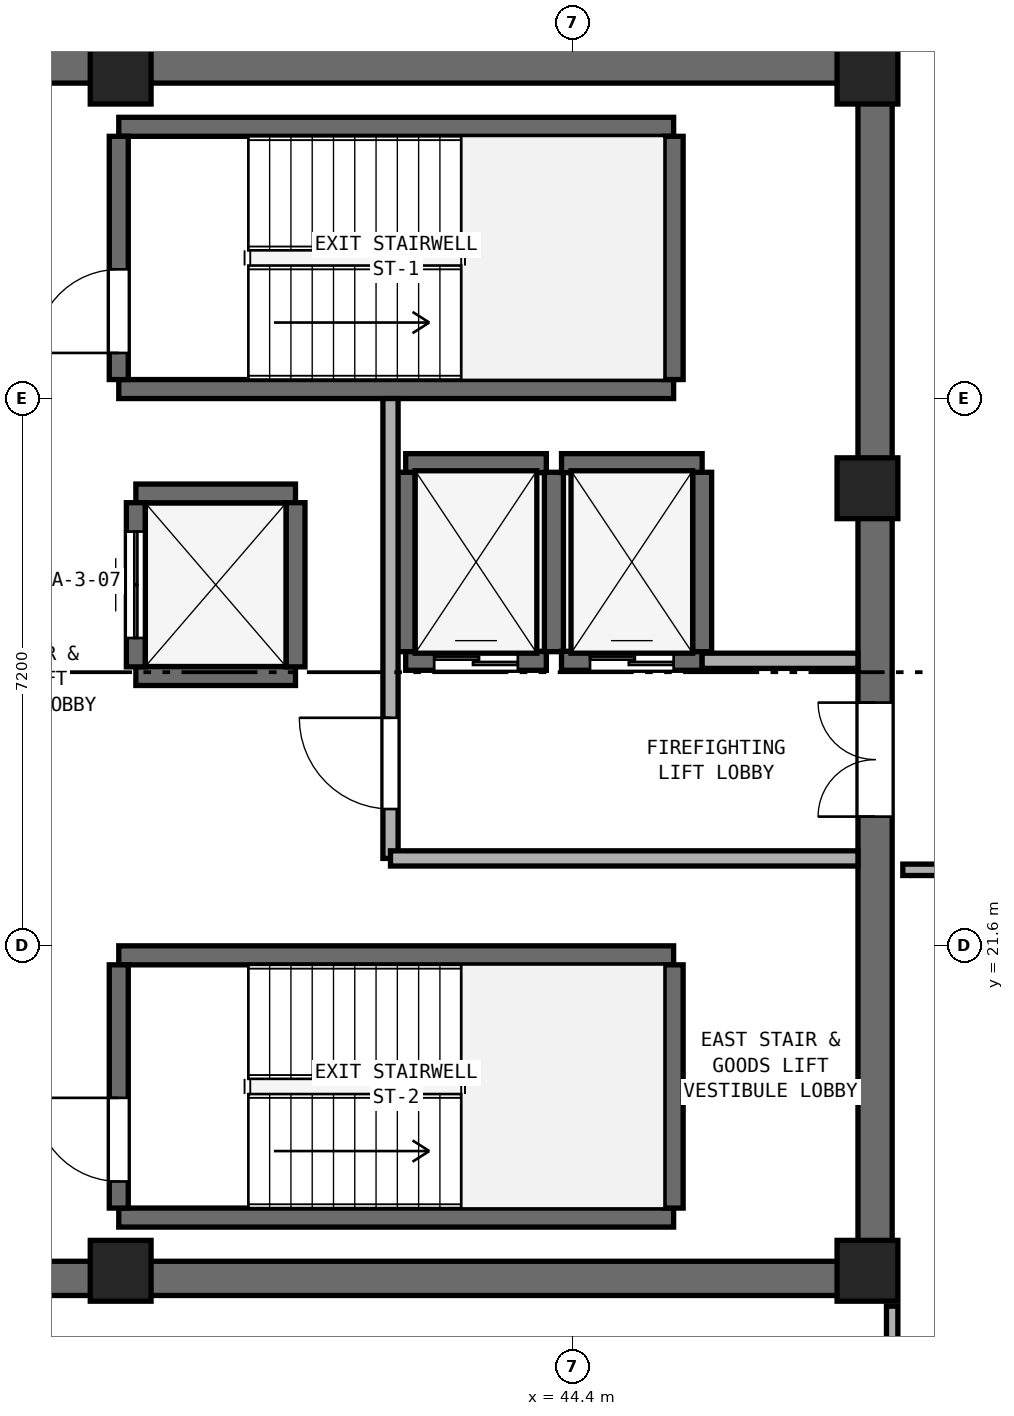
"""IFC4 building model, lengths in metres.
Left out: names, types, materials, properties, quantities, classifications, styles, units other than length and angle.
Written with IfcOpenShell. Run it as: python <this file> out.ifc"""

import sys

from ifc_helpers import new_model, si_unit, direction, frame, frame_2d, origin, origin_2d, place, context, subcontext, project, spatial, rectangle, extrude, element, fill, save


model = new_model("IFC4")
c1 = context("Model", 3, precision=1e-05, world=origin(), true_north=direction((0.0, 1.0)))
c2 = subcontext(c1, "Body", "Model", "MODEL_VIEW")
j1 = project(units=[si_unit("LENGTHUNIT", "METRE"), si_unit("PLANEANGLEUNIT", "RADIAN")], contexts=[c1])
p1 = place(None, origin())
s1 = spatial("IfcSite", under=j1, at=p1, CompositionType="ELEMENT")
p2 = place(p1, origin())
s2 = spatial("IfcBuilding", under=s1, at=p2, CompositionType="ELEMENT")
p3 = place(p2, frame((0.0, 0.0, 263.0)))
s3 = spatial("IfcBuildingStorey", under=s2, at=p3, CompositionType="ELEMENT", Elevation=263.0)
for number, where, z_axis, x_axis in (
    (1, (25.4, 17.225, 0.0), (0.0, 0.0, 1.0), (1.0, 0.0, 0.0)),
    (2, (25.4, 33.175, 0.0), (0.0, 0.0, 1.0), (1.0, 0.0, 0.0)),
):
    element("IfcWall", number, at=place(p3, frame(where, z_axis=z_axis, x_axis=x_axis)), inside=s3, PredefinedType="SHEAR", context=c2, shape_type="SweptSolid", body=[
        extrude(rectangle(XDim=23.2, YDim=0.45, at=frame_2d((11.6, 0.0))), origin(), (0.0, 0.0, 1.0), 3.51),
    ])
p4 = place(p3, frame((48.375, 17.45, 0.0), z_axis=(0.0, 0.0, 1.0), x_axis=(0.0, 1.0, 0.0)))
e3 = element("IfcWall", 3, at=p4, inside=s3, PredefinedType="SHEAR", context=c2, shape_type="SweptSolid", body=[
    extrude(rectangle(XDim=15.5, YDim=0.45, at=frame_2d((7.75, 0.0))), origin(), (0.0, 0.0, 1.0), 3.51),
])
p5 = place(p4, frame((5.85, 0.0, 0.0)))
e4 = element("IfcOpeningElement", 4, at=p5, cuts=e3, PredefinedType="OPENING", context=c2, shape_type="SweptSolid", body=[
    extrude(rectangle(XDim=1.5, YDim=2.15, at=frame_2d((0.75, 1.075))), frame((0.0, 0.235, 0.0), z_axis=(0.0, -1.0, 0.0), x_axis=(1.0, 0.0, 0.0)), (0.0, 0.0, 1.0), 0.47),
])
for number, where, z_axis, x_axis in (
    (5, (38.45, 17.325, 0.0), (0.0, 0.0, 1.0), (1.0, 0.0, 0.0)),
    (6, (48.275, 17.325, 0.0), (0.0, 0.0, 1.0), (1.0, 0.0, 0.0)),
    (7, (48.275, 27.62, 0.0), (0.0, 0.0, 1.0), (1.0, 0.0, 0.0)),
    (8, (48.275, 33.075, 0.0), (0.0, 0.0, 1.0), (1.0, 0.0, 0.0)),
    (9, (38.45, 33.075, 0.0), (0.0, 0.0, 1.0), (1.0, 0.0, 0.0)),
):
    element("IfcColumn", number, at=place(p3, frame(where, z_axis=z_axis, x_axis=x_axis)), inside=s3, PredefinedType="PILASTER", context=c2, shape_type="SweptSolid", body=[
        extrude(rectangle(XDim=0.8, YDim=0.8, at=origin_2d()), origin(), (0.0, 0.0, 1.0), 3.8),
    ])
for number, where, z_axis, x_axis in (
    (10, (38.425, 28.925, 0.0), (0.0, 0.0, 1.0), (1.0, 0.0, 0.0)),
    (11, (38.425, 32.375, 0.0), (0.0, 0.0, 1.0), (1.0, 0.0, 0.0)),
):
    element("IfcWall", number, at=place(p3, frame(where, z_axis=z_axis, x_axis=x_axis)), inside=s3, PredefinedType="SHEAR", context=c2, shape_type="SweptSolid", body=[
        extrude(rectangle(XDim=7.3, YDim=0.25, at=frame_2d((3.65, 0.0))), origin(), (0.0, 0.0, 1.0), 3.51),
    ])
p6 = place(p3, frame((38.425, 29.05, 0.0), z_axis=(0.0, 0.0, 1.0), x_axis=(0.0, 1.0, 0.0)))
e12 = element("IfcWall", 12, at=p6, inside=s3, PredefinedType="SHEAR", context=c2, shape_type="SweptSolid", body=[
    extrude(rectangle(XDim=3.2, YDim=0.25, at=frame_2d((1.6, 0.0))), origin(), (0.0, 0.0, 1.0), 3.51),
])
p7 = place(p6, frame((0.35, 0.0, 0.0)))
e13 = element("IfcOpeningElement", 13, at=p7, cuts=e12, PredefinedType="OPENING", context=c2, shape_type="SweptSolid", body=[
    extrude(rectangle(XDim=1.1, YDim=2.15, at=frame_2d((0.55, 1.075))), frame((0.0, 0.135, 0.0), z_axis=(0.0, -1.0, 0.0), x_axis=(1.0, 0.0, 0.0)), (0.0, 0.0, 1.0), 0.27),
])
p8 = place(p3, frame((45.725, 29.05, 0.0), z_axis=(0.0, 0.0, 1.0), x_axis=(0.0, 1.0, 0.0)))
e14 = element("IfcWall", 14, at=p8, inside=s3, PredefinedType="SHEAR", context=c2, shape_type="SweptSolid", body=[
    extrude(rectangle(XDim=3.2, YDim=0.25, at=frame_2d((1.6, 0.0))), origin(), (0.0, 0.0, 1.0), 3.51),
])
for number, where, z_axis, x_axis in (
    (15, (38.425, 18.025, 0.0), (0.0, 0.0, 1.0), (1.0, 0.0, 0.0)),
    (16, (38.425, 21.475, 0.0), (0.0, 0.0, 1.0), (1.0, 0.0, 0.0)),
):
    element("IfcWall", number, at=place(p3, frame(where, z_axis=z_axis, x_axis=x_axis)), inside=s3, PredefinedType="SHEAR", context=c2, shape_type="SweptSolid", body=[
        extrude(rectangle(XDim=7.3, YDim=0.25, at=frame_2d((3.65, 0.0))), origin(), (0.0, 0.0, 1.0), 3.51),
    ])
p9 = place(p3, frame((38.425, 18.15, 0.0), z_axis=(0.0, 0.0, 1.0), x_axis=(0.0, 1.0, 0.0)))
e17 = element("IfcWall", 17, at=p9, inside=s3, PredefinedType="SHEAR", context=c2, shape_type="SweptSolid", body=[
    extrude(rectangle(XDim=3.2, YDim=0.25, at=frame_2d((1.6, 0.0))), origin(), (0.0, 0.0, 1.0), 3.51),
])
p10 = place(p9, frame((0.35, 0.0, 0.0)))
e18 = element("IfcOpeningElement", 18, at=p10, cuts=e17, PredefinedType="OPENING", context=c2, shape_type="SweptSolid", body=[
    extrude(rectangle(XDim=1.1, YDim=2.15, at=frame_2d((0.55, 1.075))), frame((0.0, 0.135, 0.0), z_axis=(0.0, -1.0, 0.0), x_axis=(1.0, 0.0, 0.0)), (0.0, 0.0, 1.0), 0.27),
])
p11 = place(p3, frame((45.725, 18.15, 0.0), z_axis=(0.0, 0.0, 1.0), x_axis=(0.0, 1.0, 0.0)))
e19 = element("IfcWall", 19, at=p11, inside=s3, PredefinedType="SHEAR", context=c2, shape_type="SweptSolid", body=[
    extrude(rectangle(XDim=3.2, YDim=0.25, at=frame_2d((1.6, 0.0))), origin(), (0.0, 0.0, 1.0), 3.51),
])
p12 = place(p3, frame((42.2, 25.35, 0.0), z_axis=(0.0, 0.0, 1.0), x_axis=(1.0, 0.0, 0.0)))
e20 = element("IfcWall", 20, at=p12, inside=s3, PredefinedType="SHEAR", context=c2, shape_type="SweptSolid", body=[
    extrude(rectangle(XDim=1.85, YDim=0.25, at=frame_2d((0.925, 0.0))), origin(), (0.0, 0.0, 1.0), 3.51),
])
p13 = place(p12, frame((0.375, 0.0, 0.0)))
e21 = element("IfcOpeningElement", 21, at=p13, cuts=e20, PredefinedType="OPENING", context=c2, shape_type="SweptSolid", body=[
    extrude(rectangle(XDim=1.1, YDim=2.15, at=frame_2d((0.55, 1.075))), frame((0.0, 0.135, 0.0), z_axis=(0.0, -1.0, 0.0), x_axis=(1.0, 0.0, 0.0)), (0.0, 0.0, 1.0), 0.27),
])
p14 = place(p3, frame((42.2, 27.95, 0.0), z_axis=(0.0, 0.0, 1.0), x_axis=(1.0, 0.0, 0.0)))
e22 = element("IfcWall", 22, at=p14, inside=s3, PredefinedType="SHEAR", context=c2, shape_type="SweptSolid", body=[
    extrude(rectangle(XDim=1.85, YDim=0.25, at=frame_2d((0.925, 0.0))), origin(), (0.0, 0.0, 1.0), 3.51),
])
for number, where, z_axis, x_axis in (
    (23, (42.2, 25.47, 0.0), (0.0, 0.0, 1.0), (0.0, 1.0, 0.0)),
    (24, (44.15, 25.47, 0.0), (0.0, 0.0, 1.0), (0.0, 1.0, 0.0)),
):
    element("IfcWall", number, at=place(p3, frame(where, z_axis=z_axis, x_axis=x_axis)), inside=s3, PredefinedType="SHEAR", context=c2, shape_type="SweptSolid", body=[
        extrude(rectangle(XDim=2.36, YDim=0.25, at=frame_2d((1.18, 0.0))), origin(), (0.0, 0.0, 1.0), 3.51),
    ])
p15 = place(p3, frame((44.25, 25.35, 0.0), z_axis=(0.0, 0.0, 1.0), x_axis=(1.0, 0.0, 0.0)))
e25 = element("IfcWall", 25, at=p15, inside=s3, PredefinedType="SHEAR", context=c2, shape_type="SweptSolid", body=[
    extrude(rectangle(XDim=1.85, YDim=0.25, at=frame_2d((0.925, 0.0))), origin(), (0.0, 0.0, 1.0), 3.51),
])
p16 = place(p15, frame((0.375, 0.0, 0.0)))
e26 = element("IfcOpeningElement", 26, at=p16, cuts=e25, PredefinedType="OPENING", context=c2, shape_type="SweptSolid", body=[
    extrude(rectangle(XDim=1.1, YDim=2.15, at=frame_2d((0.55, 1.075))), frame((0.0, 0.135, 0.0), z_axis=(0.0, -1.0, 0.0), x_axis=(1.0, 0.0, 0.0)), (0.0, 0.0, 1.0), 0.27),
])
p17 = place(p3, frame((44.25, 27.95, 0.0), z_axis=(0.0, 0.0, 1.0), x_axis=(1.0, 0.0, 0.0)))
e27 = element("IfcWall", 27, at=p17, inside=s3, PredefinedType="SHEAR", context=c2, shape_type="SweptSolid", body=[
    extrude(rectangle(XDim=1.85, YDim=0.25, at=frame_2d((0.925, 0.0))), origin(), (0.0, 0.0, 1.0), 3.51),
])
p18 = place(p3, frame((46.1, 25.47, 0.0), z_axis=(0.0, 0.0, 1.0), x_axis=(0.0, 1.0, 0.0)))
e28 = element("IfcWall", 28, at=p18, inside=s3, PredefinedType="SHEAR", context=c2, shape_type="SweptSolid", body=[
    extrude(rectangle(XDim=2.36, YDim=0.25, at=frame_2d((1.18, 0.0))), origin(), (0.0, 0.0, 1.0), 3.51),
])
for number, where, z_axis, x_axis in (
    (29, (38.65, 25.15, 0.0), (0.0, 0.0, 1.0), (1.0, 0.0, 0.0)),
    (30, (38.65, 27.55, 0.0), (0.0, 0.0, 1.0), (1.0, 0.0, 0.0)),
):
    element("IfcWall", number, at=place(p3, frame(where, z_axis=z_axis, x_axis=x_axis)), inside=s3, PredefinedType="SHEAR", context=c2, shape_type="SweptSolid", body=[
        extrude(rectangle(XDim=2.1, YDim=0.25, at=frame_2d((1.05, 0.0))), origin(), (0.0, 0.0, 1.0), 3.51),
    ])
p19 = place(p3, frame((38.65, 25.27, 0.0), z_axis=(0.0, 0.0, 1.0), x_axis=(0.0, 1.0, 0.0)))
e31 = element("IfcWall", 31, at=p19, inside=s3, PredefinedType="SHEAR", context=c2, shape_type="SweptSolid", body=[
    extrude(rectangle(XDim=2.16, YDim=0.25, at=frame_2d((1.08, 0.0))), origin(), (0.0, 0.0, 1.0), 3.51),
])
p20 = place(p19, frame((0.38, 0.0, 0.0)))
e32 = element("IfcOpeningElement", 32, at=p20, cuts=e31, PredefinedType="OPENING", context=c2, shape_type="SweptSolid", body=[
    extrude(rectangle(XDim=1.4, YDim=2.2, at=frame_2d((0.7, 1.1))), frame((0.0, 0.135, 0.0), z_axis=(0.0, -1.0, 0.0), x_axis=(1.0, 0.0, 0.0)), (0.0, 0.0, 1.0), 0.27),
])
p21 = place(p3, frame((40.75, 25.27, 0.0), z_axis=(0.0, 0.0, 1.0), x_axis=(0.0, 1.0, 0.0)))
e33 = element("IfcWall", 33, at=p21, inside=s3, PredefinedType="SHEAR", context=c2, shape_type="SweptSolid", body=[
    extrude(rectangle(XDim=2.16, YDim=0.25, at=frame_2d((1.08, 0.0))), origin(), (0.0, 0.0, 1.0), 3.51),
])
p22 = place(p3, frame((42.0, 22.75, 0.0), z_axis=(0.0, 0.0, 1.0), x_axis=(0.0, 1.0, 0.0)))
e34 = element("IfcWall", 34, at=p22, inside=s3, PredefinedType="SOLIDWALL", context=c2, shape_type="SweptSolid", body=[
    extrude(rectangle(XDim=6.05, YDim=0.2, at=frame_2d((3.025, 0.0))), origin(), (0.0, 0.0, 1.0), 3.51),
])
p23 = place(p22, frame((0.65, 0.0, 0.0)))
e35 = element("IfcOpeningElement", 35, at=p23, cuts=e34, PredefinedType="OPENING", context=c2, shape_type="SweptSolid", body=[
    extrude(rectangle(XDim=1.2, YDim=2.15, at=frame_2d((0.6, 1.075))), frame((0.0, 0.11, 0.0), z_axis=(0.0, -1.0, 0.0), x_axis=(1.0, 0.0, 0.0)), (0.0, 0.0, 1.0), 0.22),
])
p24 = place(p3, frame((42.0, 22.75, 0.0), z_axis=(0.0, 0.0, 1.0), x_axis=(1.0, 0.0, 0.0)))
e36 = element("IfcWall", 36, at=p24, inside=s3, PredefinedType="SOLIDWALL", context=c2, shape_type="SweptSolid", body=[
    extrude(rectangle(XDim=6.15, YDim=0.2, at=frame_2d((3.075, 0.0))), origin(), (0.0, 0.0, 1.0), 3.51),
])
p25 = place(p3, frame((46.1, 25.35, 0.0), z_axis=(0.0, 0.0, 1.0), x_axis=(1.0, 0.0, 0.0)))
e37 = element("IfcWall", 37, at=p25, inside=s3, PredefinedType="SOLIDWALL", context=c2, shape_type="SweptSolid", body=[
    extrude(rectangle(XDim=2.05, YDim=0.2, at=frame_2d((1.025, 0.0))), origin(), (0.0, 0.0, 1.0), 3.51),
])
p26 = place(p3, frame((48.6, 13.7, 0.0), z_axis=(0.0, 0.0, 1.0), x_axis=(0.0, 1.0, 0.0)))
e38 = element("IfcWall", 38, at=p26, inside=s3, PredefinedType="PARTITIONING", context=c2, shape_type="SweptSolid", body=[
    extrude(rectangle(XDim=3.16, YDim=0.15, at=frame_2d((1.58, 0.0))), origin(), (0.0, 0.0, 1.0), 2.893),
])
p27 = place(p3, frame((48.74, 22.6, 0.0), z_axis=(0.0, 0.0, 1.0), x_axis=(1.0, 0.0, 0.0)))
e39 = element("IfcWall", 39, at=p27, inside=s3, PredefinedType="PARTITIONING", context=c2, shape_type="SweptSolid", body=[
    extrude(rectangle(XDim=3.16, YDim=0.15, at=frame_2d((1.58, 0.0))), origin(), (0.0, 0.0, 1.0), 3.51),
])
p28 = place(p7, origin())
e40 = element("IfcDoor", 40, at=p28, inside=s3, OperationType="SINGLE_SWING_LEFT", PredefinedType="DOOR", context=c2, shape_type="SweptSolid", body=[
    extrude(rectangle(XDim=1.1, YDim=2.15, at=frame_2d((0.55, 1.075))), frame((0.0, 0.025, 0.0), z_axis=(0.0, -1.0, 0.0), x_axis=(1.0, 0.0, 0.0)), (0.0, 0.0, 1.0), 0.05),
])
fill(e13, e40)
p29 = place(p10, origin())
e41 = element("IfcDoor", 41, at=p29, inside=s3, OperationType="SINGLE_SWING_RIGHT", PredefinedType="DOOR", context=c2, shape_type="SweptSolid", body=[
    extrude(rectangle(XDim=1.1, YDim=2.15, at=frame_2d((0.55, 1.075))), frame((0.0, 0.025, 0.0), z_axis=(0.0, -1.0, 0.0), x_axis=(1.0, 0.0, 0.0)), (0.0, 0.0, 1.0), 0.05),
])
fill(e18, e41)
p30 = place(p13, origin())
e42 = element("IfcDoor", 42, at=p30, inside=s3, OperationType="DOUBLE_DOOR_SLIDING", PredefinedType="DOOR", context=c2, shape_type="SweptSolid", body=[
    extrude(rectangle(XDim=1.1, YDim=2.15, at=frame_2d((0.55, 1.075))), frame((0.0, 0.025, 0.0), z_axis=(0.0, -1.0, 0.0), x_axis=(1.0, 0.0, 0.0)), (0.0, 0.0, 1.0), 0.05),
])
fill(e21, e42)
p31 = place(p16, origin())
e43 = element("IfcDoor", 43, at=p31, inside=s3, OperationType="DOUBLE_DOOR_SLIDING", PredefinedType="DOOR", context=c2, shape_type="SweptSolid", body=[
    extrude(rectangle(XDim=1.1, YDim=2.15, at=frame_2d((0.55, 1.075))), frame((0.0, 0.025, 0.0), z_axis=(0.0, -1.0, 0.0), x_axis=(1.0, 0.0, 0.0)), (0.0, 0.0, 1.0), 0.05),
])
fill(e26, e43)
p32 = place(p20, origin())
e44 = element("IfcDoor", 44, at=p32, inside=s3, OperationType="DOUBLE_DOOR_SLIDING", PredefinedType="DOOR", context=c2, shape_type="SweptSolid", body=[
    extrude(rectangle(XDim=1.4, YDim=2.2, at=frame_2d((0.7, 1.1))), frame((0.0, 0.025, 0.0), z_axis=(0.0, -1.0, 0.0), x_axis=(1.0, 0.0, 0.0)), (0.0, 0.0, 1.0), 0.05),
])
fill(e32, e44)
p33 = place(p23, origin())
e45 = element("IfcDoor", 45, at=p33, inside=s3, OperationType="SINGLE_SWING_RIGHT", PredefinedType="DOOR", context=c2, shape_type="SweptSolid", body=[
    extrude(rectangle(XDim=1.2, YDim=2.15, at=frame_2d((0.6, 1.075))), frame((0.0, 0.025, 0.0), z_axis=(0.0, -1.0, 0.0), x_axis=(1.0, 0.0, 0.0)), (0.0, 0.0, 1.0), 0.05),
])
fill(e35, e45)
p34 = place(p5, origin())
e46 = element("IfcDoor", 46, at=p34, inside=s3, OperationType="DOUBLE_DOOR_SINGLE_SWING", PredefinedType="DOOR", context=c2, shape_type="SweptSolid", body=[
    extrude(rectangle(XDim=1.5, YDim=2.15, at=frame_2d((0.75, 1.075))), frame((0.0, 0.025, 0.0), z_axis=(0.0, -1.0, 0.0), x_axis=(1.0, 0.0, 0.0)), (0.0, 0.0, 1.0), 0.05),
])
fill(e4, e46)
save(model, sys.argv[1])
